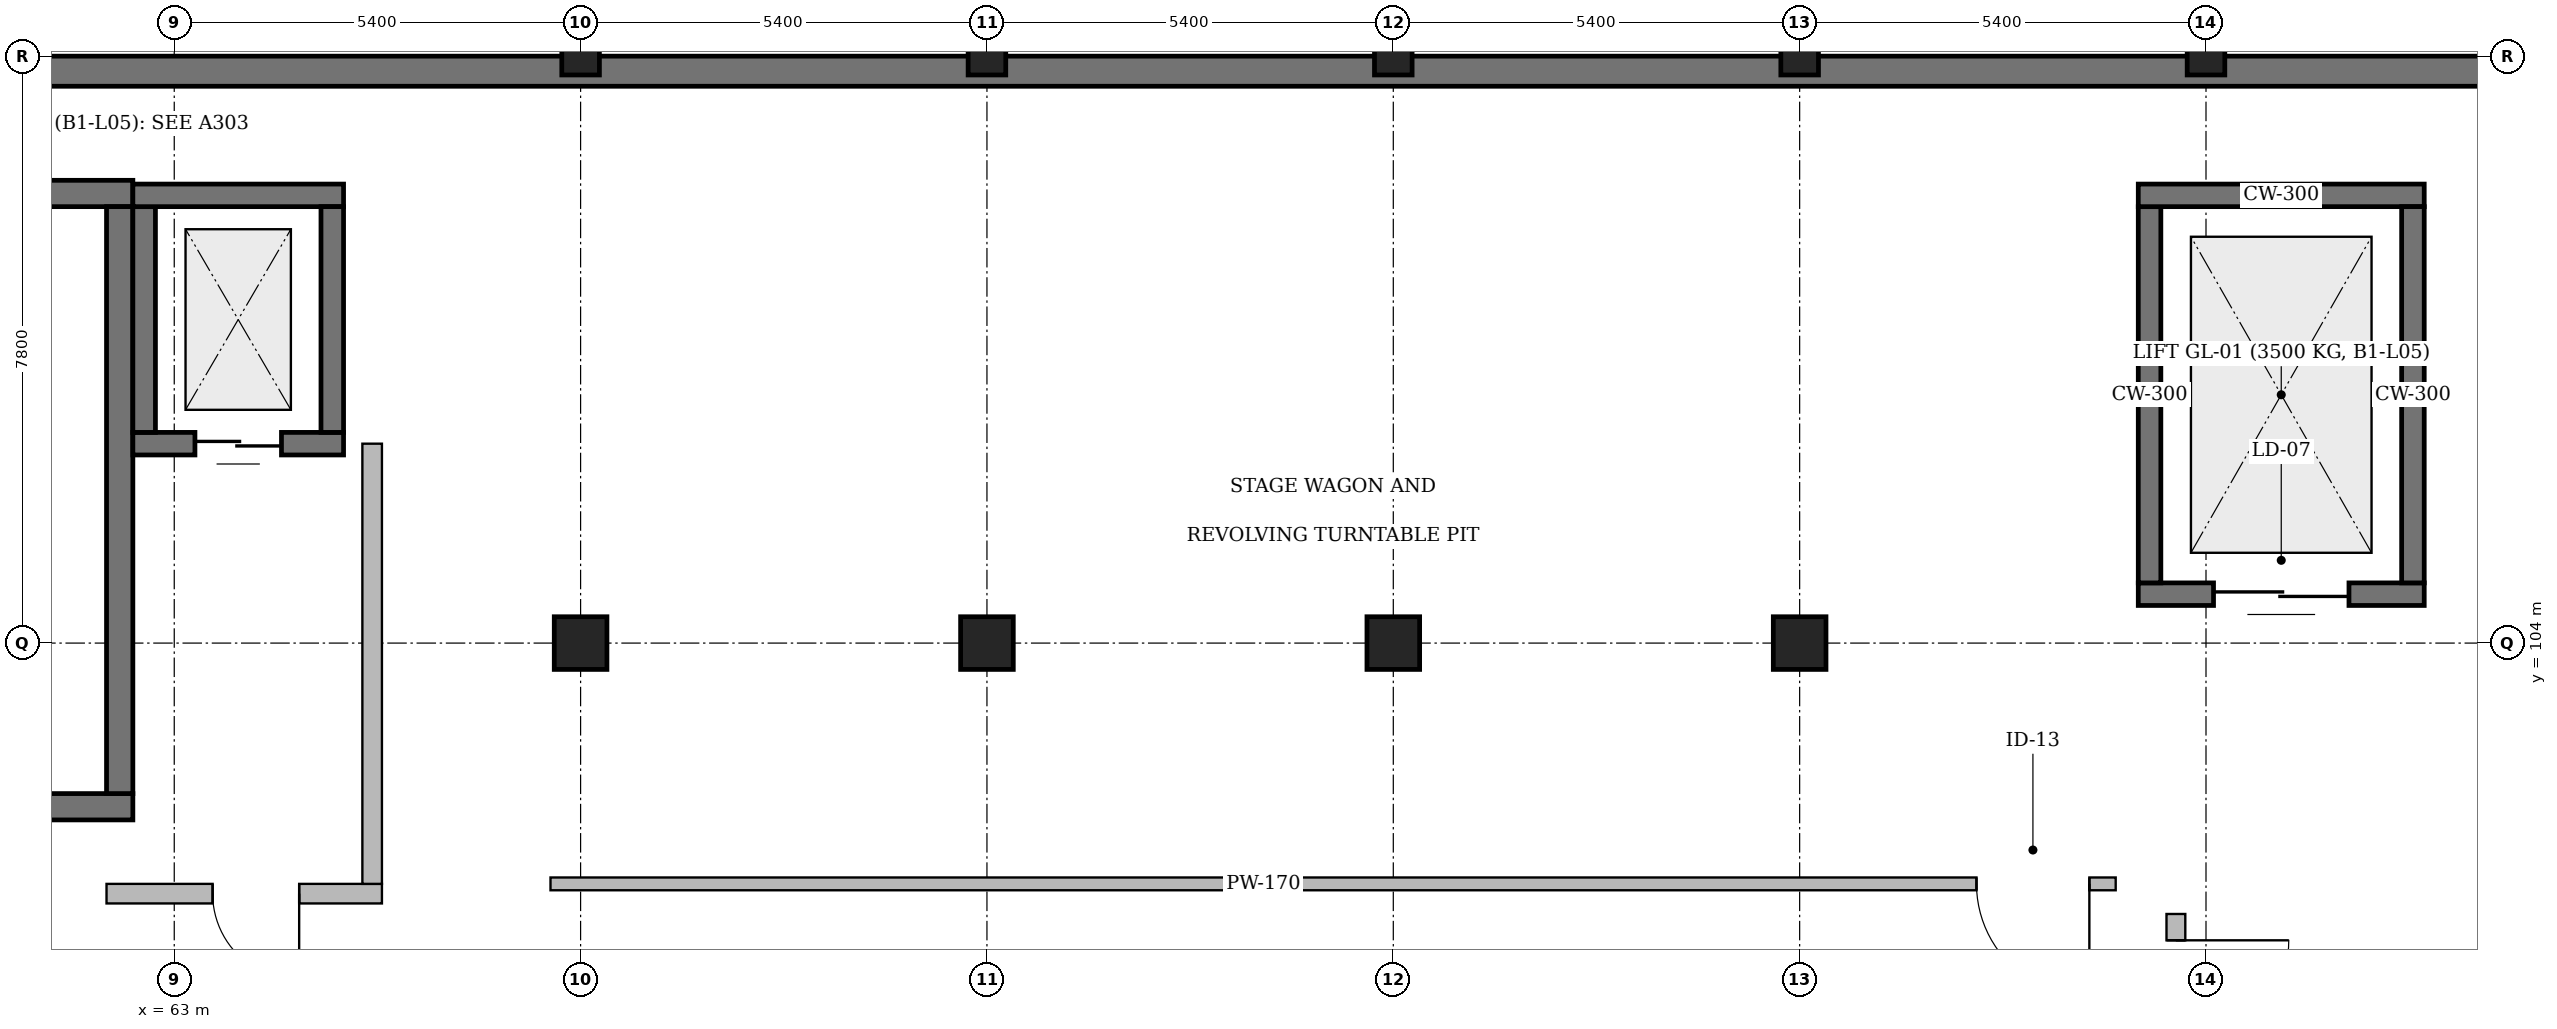
"""IFC4 building model, lengths in metres.
Left out: names, types, materials, properties, quantities, classifications, styles, units other than length and angle.
Written with IfcOpenShell. Run it as: python <this file> out.ifc"""

import sys

from ifc_helpers import new_model, si_unit, direction, frame, frame_2d, origin, origin_2d, place, context, subcontext, project, spatial, rectangle, extrude, element, fill, save


model = new_model("IFC4")
c1 = context("Model", 3, precision=1e-05, world=origin(), true_north=direction((0.0, 1.0)))
c2 = subcontext(c1, "Body", "Model", "MODEL_VIEW")
j1 = project(units=[si_unit("LENGTHUNIT", "METRE"), si_unit("PLANEANGLEUNIT", "RADIAN")], contexts=[c1])
p1 = place(None, origin())
s1 = spatial("IfcSite", under=j1, at=p1, CompositionType="ELEMENT")
p2 = place(p1, origin())
s2 = spatial("IfcBuilding", under=s1, at=p2, CompositionType="ELEMENT")
p3 = place(p2, frame((0.0, 0.0, -4.8)))
s3 = spatial("IfcBuildingStorey", under=s2, at=p3, CompositionType="ELEMENT", Elevation=-4.8)
p4 = place(p3, frame((68.4, 104.0, 0.0), z_axis=(0.0, 0.0, 1.0), x_axis=(1.0, 0.0, 0.0)))
e1 = element("IfcColumn", 1, at=p4, inside=s3, PredefinedType="COLUMN", context=c2, shape_type="SweptSolid", body=[
    extrude(rectangle(XDim=0.7, YDim=0.7, at=origin_2d()), origin(), (0.0, 0.0, 1.0), 4.8),
])
p5 = place(p3, frame((68.4, 111.8, 0.0), z_axis=(0.0, 0.0, 1.0), x_axis=(1.0, 0.0, 0.0)))
e2 = element("IfcColumn", 2, at=p5, inside=s3, PredefinedType="COLUMN", context=c2, shape_type="SweptSolid", body=[
    extrude(rectangle(XDim=0.5, YDim=0.5, at=origin_2d()), origin(), (0.0, 0.0, 1.0), 4.8),
])
p6 = place(p3, frame((73.8, 104.0, 0.0), z_axis=(0.0, 0.0, 1.0), x_axis=(1.0, 0.0, 0.0)))
e3 = element("IfcColumn", 3, at=p6, inside=s3, PredefinedType="COLUMN", context=c2, shape_type="SweptSolid", body=[
    extrude(rectangle(XDim=0.7, YDim=0.7, at=origin_2d()), origin(), (0.0, 0.0, 1.0), 4.8),
])
p7 = place(p3, frame((73.8, 111.8, 0.0), z_axis=(0.0, 0.0, 1.0), x_axis=(1.0, 0.0, 0.0)))
e4 = element("IfcColumn", 4, at=p7, inside=s3, PredefinedType="COLUMN", context=c2, shape_type="SweptSolid", body=[
    extrude(rectangle(XDim=0.5, YDim=0.5, at=origin_2d()), origin(), (0.0, 0.0, 1.0), 4.8),
])
p8 = place(p3, frame((79.2, 104.0, 0.0), z_axis=(0.0, 0.0, 1.0), x_axis=(1.0, 0.0, 0.0)))
e5 = element("IfcColumn", 5, at=p8, inside=s3, PredefinedType="COLUMN", context=c2, shape_type="SweptSolid", body=[
    extrude(rectangle(XDim=0.7, YDim=0.7, at=origin_2d()), origin(), (0.0, 0.0, 1.0), 4.8),
])
p9 = place(p3, frame((79.2, 111.8, 0.0), z_axis=(0.0, 0.0, 1.0), x_axis=(1.0, 0.0, 0.0)))
e6 = element("IfcColumn", 6, at=p9, inside=s3, PredefinedType="COLUMN", context=c2, shape_type="SweptSolid", body=[
    extrude(rectangle(XDim=0.5, YDim=0.5, at=origin_2d()), origin(), (0.0, 0.0, 1.0), 4.8),
])
p10 = place(p3, frame((84.6, 104.0, 0.0), z_axis=(0.0, 0.0, 1.0), x_axis=(1.0, 0.0, 0.0)))
e7 = element("IfcColumn", 7, at=p10, inside=s3, PredefinedType="COLUMN", context=c2, shape_type="SweptSolid", body=[
    extrude(rectangle(XDim=0.7, YDim=0.7, at=origin_2d()), origin(), (0.0, 0.0, 1.0), 4.8),
])
for number, where, z_axis, x_axis in (
    (8, (84.6, 111.8, 0.0), (0.0, 0.0, 1.0), (1.0, 0.0, 0.0)),
    (9, (90.0, 111.8, 0.0), (0.0, 0.0, 1.0), (1.0, 0.0, 0.0)),
):
    element("IfcColumn", number, at=place(p3, frame(where, z_axis=z_axis, x_axis=x_axis)), inside=s3, PredefinedType="COLUMN", context=c2, shape_type="SweptSolid", body=[
        extrude(rectangle(XDim=0.5, YDim=0.5, at=origin_2d()), origin(), (0.0, 0.0, 1.0), 4.8),
    ])
for number, where, z_axis, x_axis in (
    (10, (62.45, 101.825, 0.0), (0.0, 0.0, 1.0), (-1.0, 0.0, 0.0)),
    (11, (58.0, 109.975, 0.0), (0.0, 0.0, 1.0), (1.0, 0.0, 0.0)),
):
    element("IfcWall", number, at=place(p3, frame(where, z_axis=z_axis, x_axis=x_axis)), inside=s3, PredefinedType="SOLIDWALL", context=c2, shape_type="SweptSolid", body=[
        extrude(rectangle(XDim=4.45, YDim=0.35, at=frame_2d((2.225, 0.0))), origin(), (0.0, 0.0, 1.0), 4.48),
    ])
p11 = place(p3, frame((62.275, 109.8, 0.0), z_axis=(0.0, 0.0, 1.0), x_axis=(0.0, -1.0, 0.0)))
e12 = element("IfcWall", 12, at=p11, inside=s3, PredefinedType="SOLIDWALL", context=c2, shape_type="SweptSolid", body=[
    extrude(rectangle(XDim=7.8, YDim=0.35, at=frame_2d((3.9, 0.0))), origin(), (0.0, 0.0, 1.0), 4.48),
])
p12 = place(p3, frame((65.25, 106.65, 0.0), z_axis=(0.0, 0.0, 1.0), x_axis=(-1.0, 0.0, 0.0)))
e13 = element("IfcWall", 13, at=p12, inside=s3, PredefinedType="SOLIDWALL", context=c2, shape_type="SweptSolid", body=[
    extrude(rectangle(XDim=2.8, YDim=0.3, at=frame_2d((1.4, 0.0))), origin(), (0.0, 0.0, 1.0), 4.8),
])
p13 = place(p12, frame((0.825, 0.0, 0.0)))
e14 = element("IfcOpeningElement", 14, at=p13, cuts=e13, PredefinedType="OPENING", context=c2, shape_type="SweptSolid", body=[
    extrude(rectangle(XDim=1.15, YDim=2.1, at=frame_2d((0.575, 1.05))), frame((0.0, 0.17, 0.0), z_axis=(0.0, -1.0, 0.0), x_axis=(1.0, 0.0, 0.0)), (0.0, 0.0, 1.0), 0.34),
])
p14 = place(p3, frame((62.6, 106.8, 0.0), z_axis=(0.0, 0.0, 1.0), x_axis=(0.0, 1.0, 0.0)))
e15 = element("IfcWall", 15, at=p14, inside=s3, PredefinedType="SOLIDWALL", context=c2, shape_type="SweptSolid", body=[
    extrude(rectangle(XDim=3.0, YDim=0.3, at=frame_2d((1.5, 0.0))), origin(), (0.0, 0.0, 1.0), 4.8),
])
p15 = place(p3, frame((62.45, 109.95, 0.0), z_axis=(0.0, 0.0, 1.0), x_axis=(1.0, 0.0, 0.0)))
e16 = element("IfcWall", 16, at=p15, inside=s3, PredefinedType="SOLIDWALL", context=c2, shape_type="SweptSolid", body=[
    extrude(rectangle(XDim=2.8, YDim=0.3, at=frame_2d((1.4, 0.0))), origin(), (0.0, 0.0, 1.0), 4.8),
])
p16 = place(p3, frame((65.1, 109.8, 0.0), z_axis=(0.0, 0.0, 1.0), x_axis=(0.0, -1.0, 0.0)))
e17 = element("IfcWall", 17, at=p16, inside=s3, PredefinedType="SOLIDWALL", context=c2, shape_type="SweptSolid", body=[
    extrude(rectangle(XDim=3.0, YDim=0.3, at=frame_2d((1.5, 0.0))), origin(), (0.0, 0.0, 1.0), 4.8),
])
p17 = place(p3, frame((65.76, 100.67, 0.0), z_axis=(0.0, 0.0, 1.0), x_axis=(-1.0, 0.0, 0.0)))
e18 = element("IfcWall", 18, at=p17, inside=s3, PredefinedType="SOLIDWALL", context=c2, shape_type="SweptSolid", body=[
    extrude(rectangle(XDim=3.66, YDim=0.26, at=frame_2d((1.83, 0.0))), origin(), (0.0, 0.0, 1.0), 4.48),
])
p18 = place(p17, frame((1.1, 0.0, 0.0)))
e19 = element("IfcOpeningElement", 19, at=p18, cuts=e18, PredefinedType="OPENING", context=c2, shape_type="SweptSolid", body=[
    extrude(rectangle(XDim=1.15, YDim=2.2, at=frame_2d((0.575, 1.1))), frame((0.0, 0.15, 0.0), z_axis=(0.0, -1.0, 0.0), x_axis=(1.0, 0.0, 0.0)), (0.0, 0.0, 1.0), 0.3),
])
p19 = place(p3, frame((65.63, 106.65, 0.0), z_axis=(0.0, 0.0, 1.0), x_axis=(0.0, -1.0, 0.0)))
e20 = element("IfcWall", 20, at=p19, inside=s3, PredefinedType="SOLIDWALL", context=c2, shape_type="SweptSolid", body=[
    extrude(rectangle(XDim=5.85, YDim=0.26, at=frame_2d((2.925, 0.0))), origin(), (0.0, 0.0, 1.0), 4.48),
])
p20 = place(p3, frame((92.9, 104.65, 0.0), z_axis=(0.0, 0.0, 1.0), x_axis=(-1.0, 0.0, 0.0)))
e21 = element("IfcWall", 21, at=p20, inside=s3, PredefinedType="SOLIDWALL", context=c2, shape_type="SweptSolid", body=[
    extrude(rectangle(XDim=3.8, YDim=0.3, at=frame_2d((1.9, 0.0))), origin(), (0.0, 0.0, 1.0), 4.8),
])
p21 = place(p20, frame((1.0, 0.0, 0.0)))
e22 = element("IfcOpeningElement", 22, at=p21, cuts=e21, PredefinedType="OPENING", context=c2, shape_type="SweptSolid", body=[
    extrude(rectangle(XDim=1.8, YDim=2.4, at=frame_2d((0.9, 1.2))), frame((0.0, 0.17, 0.0), z_axis=(0.0, -1.0, 0.0), x_axis=(1.0, 0.0, 0.0)), (0.0, 0.0, 1.0), 0.34),
])
p22 = place(p3, frame((89.25, 104.8, 0.0), z_axis=(0.0, 0.0, 1.0), x_axis=(0.0, 1.0, 0.0)))
e23 = element("IfcWall", 23, at=p22, inside=s3, PredefinedType="SOLIDWALL", context=c2, shape_type="SweptSolid", body=[
    extrude(rectangle(XDim=5.0, YDim=0.3, at=frame_2d((2.5, 0.0))), origin(), (0.0, 0.0, 1.0), 4.8),
])
p23 = place(p3, frame((89.1, 109.95, 0.0), z_axis=(0.0, 0.0, 1.0), x_axis=(1.0, 0.0, 0.0)))
e24 = element("IfcWall", 24, at=p23, inside=s3, PredefinedType="SOLIDWALL", context=c2, shape_type="SweptSolid", body=[
    extrude(rectangle(XDim=3.8, YDim=0.3, at=frame_2d((1.9, 0.0))), origin(), (0.0, 0.0, 1.0), 4.8),
])
p24 = place(p3, frame((92.75, 109.8, 0.0), z_axis=(0.0, 0.0, 1.0), x_axis=(0.0, -1.0, 0.0)))
e25 = element("IfcWall", 25, at=p24, inside=s3, PredefinedType="SOLIDWALL", context=c2, shape_type="SweptSolid", body=[
    extrude(rectangle(XDim=5.0, YDim=0.3, at=frame_2d((2.5, 0.0))), origin(), (0.0, 0.0, 1.0), 4.8),
])
p25 = place(p3, frame((57.6, 111.6, 0.0), z_axis=(0.0, 0.0, 1.0), x_axis=(1.0, 0.0, 0.0)))
e26 = element("IfcWall", 26, at=p25, inside=s3, PredefinedType="SOLIDWALL", context=c2, shape_type="SweptSolid", body=[
    extrude(rectangle(XDim=93.0, YDim=0.4, at=frame_2d((46.5, 0.0))), origin(), (0.0, 0.0, 1.0), 4.48),
])
p26 = place(p3, frame((89.6, 100.4, 0.0), z_axis=(0.0, 0.0, 1.0), x_axis=(0.0, -1.0, 0.0)))
e27 = element("IfcWall", 27, at=p26, inside=s3, PredefinedType="PARTITIONING", context=c2, shape_type="SweptSolid", body=[
    extrude(rectangle(XDim=3.83, YDim=0.25, at=frame_2d((1.915, 0.0))), origin(), (0.0, 0.0, 1.0), 4.48),
])
p27 = place(p26, frame((0.35, 0.0, 0.0)))
e28 = element("IfcOpeningElement", 28, at=p27, cuts=e27, PredefinedType="OPENING", context=c2, shape_type="SweptSolid", body=[
    extrude(rectangle(XDim=1.5, YDim=2.2, at=frame_2d((0.75, 1.1))), frame((0.0, 0.145, 0.0), z_axis=(0.0, -1.0, 0.0), x_axis=(1.0, 0.0, 0.0)), (0.0, 0.0, 1.0), 0.29),
])
p28 = place(p3, frame((88.8, 100.8, 0.0), z_axis=(0.0, 0.0, 1.0), x_axis=(-1.0, 0.0, 0.0)))
e29 = element("IfcWall", 29, at=p28, inside=s3, PredefinedType="PARTITIONING", context=c2, shape_type="SweptSolid", body=[
    extrude(rectangle(XDim=20.8, YDim=0.17, at=frame_2d((10.4, 0.0))), origin(), (0.0, 0.0, 1.0), 4.48),
])
p29 = place(p28, frame((0.35, 0.0, 0.0)))
e30 = element("IfcOpeningElement", 30, at=p29, cuts=e29, PredefinedType="OPENING", context=c2, shape_type="SweptSolid", body=[
    extrude(rectangle(XDim=1.5, YDim=2.2, at=frame_2d((0.75, 1.1))), frame((0.0, 0.105, 0.0), z_axis=(0.0, -1.0, 0.0), x_axis=(1.0, 0.0, 0.0)), (0.0, 0.0, 1.0), 0.21),
])
p30 = place(p13, origin())
e31 = element("IfcDoor", 31, at=p30, inside=s3, OperationType="DOUBLE_DOOR_SLIDING", PredefinedType="DOOR", context=c2, shape_type="SweptSolid", body=[
    extrude(rectangle(XDim=1.15, YDim=2.1, at=frame_2d((0.575, 1.05))), frame((0.0, 0.025, 0.0), z_axis=(0.0, -1.0, 0.0), x_axis=(1.0, 0.0, 0.0)), (0.0, 0.0, 1.0), 0.05),
])
fill(e14, e31)
p31 = place(p18, origin())
e32 = element("IfcDoor", 32, at=p31, inside=s3, OperationType="SINGLE_SWING_LEFT", PredefinedType="DOOR", context=c2, shape_type="SweptSolid", body=[
    extrude(rectangle(XDim=1.15, YDim=2.2, at=frame_2d((0.575, 1.1))), frame((0.0, 0.025, 0.0), z_axis=(0.0, -1.0, 0.0), x_axis=(1.0, 0.0, 0.0)), (0.0, 0.0, 1.0), 0.05),
])
fill(e19, e32)
p32 = place(p21, origin())
e33 = element("IfcDoor", 33, at=p32, inside=s3, OperationType="DOUBLE_DOOR_SLIDING", PredefinedType="DOOR", context=c2, shape_type="SweptSolid", body=[
    extrude(rectangle(XDim=1.8, YDim=2.4, at=frame_2d((0.9, 1.2))), frame((0.0, 0.025, 0.0), z_axis=(0.0, -1.0, 0.0), x_axis=(1.0, 0.0, 0.0)), (0.0, 0.0, 1.0), 0.05),
])
fill(e22, e33)
p33 = place(p27, origin())
e34 = element("IfcDoor", 34, at=p33, inside=s3, OperationType="DOUBLE_DOOR_SINGLE_SWING", PredefinedType="DOOR", context=c2, shape_type="SweptSolid", body=[
    extrude(rectangle(XDim=1.5, YDim=2.2, at=frame_2d((0.75, 1.1))), frame((0.0, 0.025, 0.0), z_axis=(0.0, -1.0, 0.0), x_axis=(1.0, 0.0, 0.0)), (0.0, 0.0, 1.0), 0.05),
])
fill(e28, e34)
p34 = place(p29, origin())
e35 = element("IfcDoor", 35, at=p34, inside=s3, OperationType="DOUBLE_DOOR_SINGLE_SWING", PredefinedType="DOOR", context=c2, shape_type="SweptSolid", body=[
    extrude(rectangle(XDim=1.5, YDim=2.2, at=frame_2d((0.75, 1.1))), frame((0.0, 0.025, 0.0), z_axis=(0.0, -1.0, 0.0), x_axis=(1.0, 0.0, 0.0)), (0.0, 0.0, 1.0), 0.05),
])
fill(e30, e35)
save(model, sys.argv[1])
